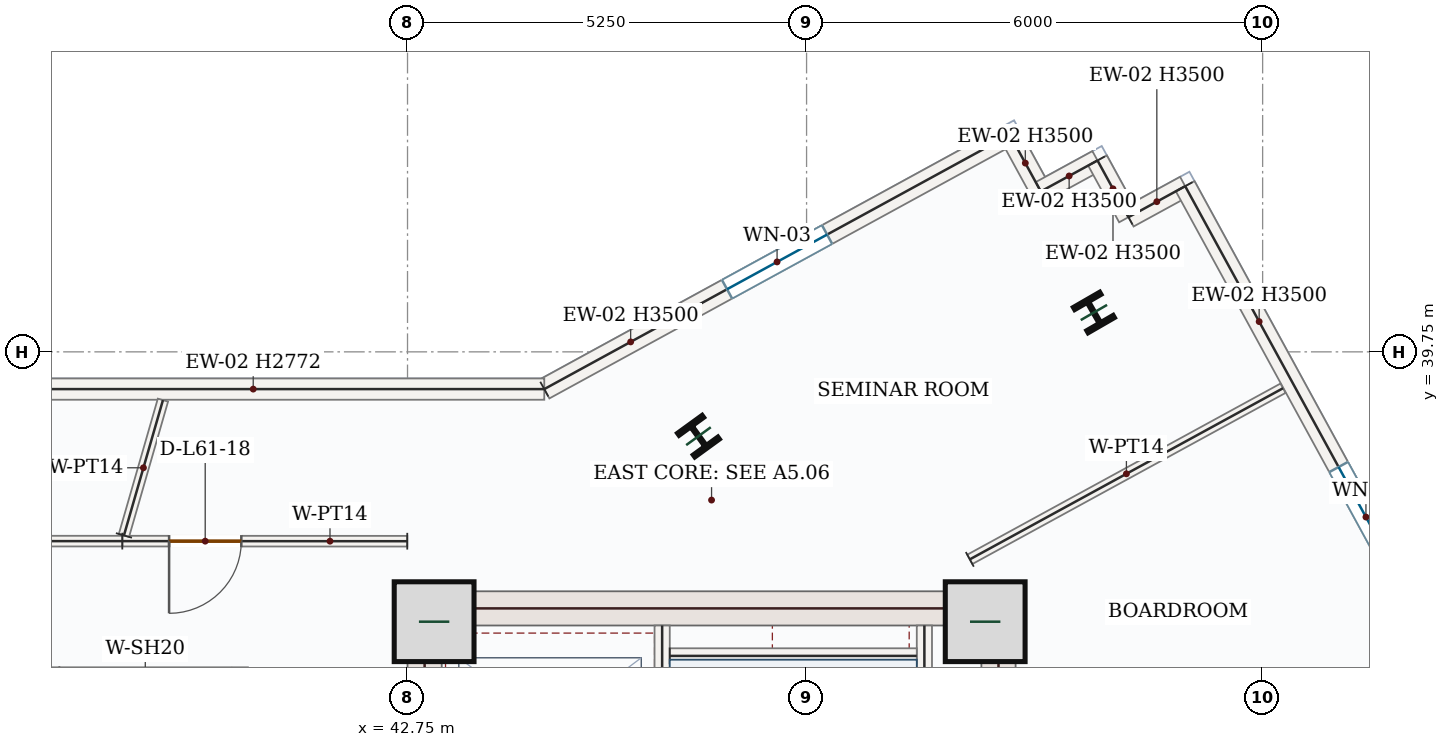
"""IFC4 building model, lengths in metres.
Left out: names, types, materials, properties, quantities, classifications, styles, units other than length and angle.
Written with IfcOpenShell. Run it as: python <this file> out.ifc"""

import sys

from ifc_helpers import new_model, si_unit, direction, frame, frame_2d, origin, origin_2d, place, context, subcontext, project, spatial, rectangle, i_section, extrude, source, transform, mapped, element, fill, save


model = new_model("IFC4")
c1 = context("Model", 3, precision=1e-05, world=origin(), true_north=direction((0.0, 1.0)))
c2 = subcontext(c1, "Body", "Model", "MODEL_VIEW")
j1 = project(units=[si_unit("LENGTHUNIT", "METRE"), si_unit("PLANEANGLEUNIT", "RADIAN")], contexts=[c1])
p1 = place(None, origin())
s1 = spatial("IfcSite", under=j1, at=p1, CompositionType="ELEMENT")
p2 = place(p1, origin())
s2 = spatial("IfcBuilding", under=s1, at=p2, CompositionType="ELEMENT")
p3 = place(p2, frame((0.0, 0.0, 257.85)))
s3 = spatial("IfcBuildingStorey", under=s2, at=p3, CompositionType="ELEMENT", Elevation=257.85)
p4 = place(p3, frame((42.975, 28.05, 0.0), z_axis=(0.0, 0.0, 1.0), x_axis=(0.0, 1.0, 0.0)))
e1 = element("IfcWall", 1, at=p4, inside=s3, PredefinedType="SHEAR", context=c2, shape_type="SweptSolid", body=[
    extrude(rectangle(XDim=8.55, YDim=0.45, at=frame_2d((4.275, 0.0))), origin(), (0.0, 0.0, 1.0), 3.5),
])
p5 = place(p4, frame((1.5, 0.0, 0.0)))
e2 = element("IfcOpeningElement", 2, at=p5, cuts=e1, PredefinedType="OPENING", context=c2, shape_type="SweptSolid", body=[
    extrude(rectangle(XDim=1.1, YDim=2.2, at=frame_2d((0.55, 1.1))), frame((0.0, 0.235, 0.0), z_axis=(0.0, -1.0, 0.0), x_axis=(1.0, 0.0, 0.0)), (0.0, 0.0, 1.0), 0.47),
])
m1 = source(origin(), c2, "Body", "SweptSolid", [
    extrude(rectangle(XDim=8.55, YDim=0.45, at=frame_2d((4.275, 0.0))), origin(), (0.0, 0.0, 1.0), 3.5),
])
p6 = place(p3, frame((50.525, 28.05, 0.0), z_axis=(0.0, 0.0, 1.0), x_axis=(0.0, 1.0, 0.0)))
e3 = element("IfcWall", 3, at=p6, inside=s3, PredefinedType="SHEAR", context=c2, shape_type="MappedRepresentation", body=[
    mapped(m1, transform((0.0, 0.0, 0.0), x_axis=(1.0, 0.0, 0.0), y_axis=(0.0, 1.0, 0.0), z_axis=(0.0, 0.0, 1.0), scale=1.0)),
])
m2 = source(origin(), c2, "Body", "SweptSolid", [
    extrude(rectangle(XDim=7.1, YDim=0.45, at=frame_2d((3.55, 0.0))), origin(), (0.0, 0.0, 1.0), 3.5),
])
p7 = place(p3, frame((43.2, 36.375, 0.0), z_axis=(0.0, 0.0, 1.0), x_axis=(1.0, 0.0, 0.0)))
e4 = element("IfcWall", 4, at=p7, inside=s3, PredefinedType="SHEAR", context=c2, shape_type="MappedRepresentation", body=[
    mapped(m2, transform((0.0, 0.0, 0.0), x_axis=(1.0, 0.0, 0.0), y_axis=(0.0, 1.0, 0.0), z_axis=(0.0, 0.0, 1.0), scale=1.0)),
])
m3 = source(origin(), c2, "Body", "SweptSolid", [
    extrude(rectangle(XDim=1.05, YDim=1.05, at=origin_2d()), origin(), (0.0, 0.0, 1.0), 3.75),
])
for number, where, z_axis, x_axis in (
    (5, (43.1, 36.2, 0.0), (0.0, 0.0, 1.0), (1.0, 0.0, 0.0)),
    (6, (50.35, 36.2, 0.0), (0.0, 0.0, 1.0), (1.0, 0.0, 0.0)),
):
    element("IfcColumn", number, at=place(p3, frame(where, z_axis=z_axis, x_axis=x_axis)), inside=s3, PredefinedType="COLUMN", context=c2, shape_type="MappedRepresentation", body=[
        mapped(m3, transform((0.0, 0.0, 0.0), x_axis=(1.0, 0.0, 0.0), y_axis=(0.0, 1.0, 0.0), z_axis=(0.0, 0.0, 1.0), scale=1.0)),
    ])
m4 = source(origin(), c2, "Body", "SweptSolid", [
    extrude(i_section(OverallWidth=0.399, OverallDepth=0.386, WebThickness=0.021, FlangeThickness=0.033, FilletRadius=0.018, at=origin_2d()), origin(), (0.0, 0.0, 1.0), 3.75),
])
for number, where, z_axis, x_axis in (
    (7, (46.578, 38.641, 0.0), (0.0, 0.0, 1.0), (0.809, 0.588, 0.0)),
    (8, (51.78, 40.268, 0.0), (0.0, 0.0, 1.0), (0.866, 0.5, 0.0)),
):
    element("IfcColumn", number, at=place(p3, frame(where, z_axis=z_axis, x_axis=x_axis)), inside=s3, PredefinedType="COLUMN", context=c2, shape_type="MappedRepresentation", body=[
        mapped(m4, transform((0.0, 0.0, 0.0), x_axis=(1.0, 0.0, 0.0), y_axis=(0.0, 1.0, 0.0), z_axis=(0.0, 0.0, 1.0), scale=1.0)),
    ])
p8 = place(p3, frame((44.549, 39.26, 0.0), z_axis=(0.0, 0.0, 1.0), x_axis=(0.877569176667, 0.479450039279, 0.0)))
e9 = element("IfcWall", 9, at=p8, inside=s3, PredefinedType="SOLIDWALL", context=c2, shape_type="SweptSolid", body=[
    extrude(rectangle(XDim=6.979, YDim=0.28, at=frame_2d((3.49, 0.0))), origin(), (0.0, 0.0, 1.0), 3.5),
])
p9 = place(p8, frame((2.74, 0.0, 0.85)))
e10 = element("IfcOpeningElement", 10, at=p9, cuts=e9, PredefinedType="OPENING", context=c2, shape_type="SweptSolid", body=[
    extrude(rectangle(XDim=1.5, YDim=1.5, at=frame_2d((0.75, 0.75))), frame((0.0, 0.15, 0.0), z_axis=(0.0, -1.0, 0.0), x_axis=(1.0, 0.0, 0.0)), (0.0, 0.0, 1.0), 0.3),
])
m5 = source(origin(), c2, "Body", "SweptSolid", [
    extrude(rectangle(XDim=0.85, YDim=0.28, at=frame_2d((0.425, 0.0))), origin(), (0.0, 0.0, 1.0), 3.5),
])
for number, where, z_axis, x_axis in (
    (11, (50.674, 42.606, 0.0), (0.0, 0.0, 1.0), (0.479, -0.878, 0.0)),
    (12, (51.082, 41.86, 0.0), (0.0, 0.0, 1.0), (0.878, 0.479, 0.0)),
):
    element("IfcWall", number, at=place(p3, frame(where, z_axis=z_axis, x_axis=x_axis)), inside=s3, PredefinedType="SOLIDWALL", context=c2, shape_type="MappedRepresentation", body=[
        mapped(m5, transform((0.0, 0.0, 0.0), x_axis=(1.0, 0.0, 0.0), y_axis=(0.0, 1.0, 0.0), z_axis=(0.0, 0.0, 1.0), scale=1.0)),
    ])
m6 = source(origin(), c2, "Body", "SweptSolid", [
    extrude(rectangle(XDim=0.85, YDim=0.28, at=frame_2d((0.425, 0.0))), origin(), (0.0, 0.0, 1.0), 3.5),
])
p10 = place(p3, frame((51.827, 42.268, 0.0), z_axis=(0.0, 0.0, 1.0), x_axis=(0.479656876283, -0.877456141943, 0.0)))
e13 = element("IfcWall", 13, at=p10, inside=s3, PredefinedType="SOLIDWALL", context=c2, shape_type="MappedRepresentation", body=[
    mapped(m6, transform((0.0, 0.0, 0.0), x_axis=(1.0, 0.0, 0.0), y_axis=(0.0, 1.0, 0.0), z_axis=(0.0, 0.0, 1.0), scale=1.0)),
])
p11 = place(p3, frame((52.235, 41.522, 0.0), z_axis=(0.0, 0.0, 1.0), x_axis=(0.877577015132, 0.479435691737, 0.0)))
e14 = element("IfcWall", 14, at=p11, inside=s3, PredefinedType="SOLIDWALL", context=c2, shape_type="MappedRepresentation", body=[
    mapped(m5, transform((0.0, 0.0, 0.0), x_axis=(1.0, 0.0, 0.0), y_axis=(0.0, 1.0, 0.0), z_axis=(0.0, 0.0, 1.0), scale=1.0)),
])
p12 = place(p3, frame((52.981, 41.929, 0.0), z_axis=(0.0, 0.0, 1.0), x_axis=(0.479472774144, -0.877556755347, 0.0)))
e15 = element("IfcWall", 15, at=p12, inside=s3, PredefinedType="SOLIDWALL", context=c2, shape_type="SweptSolid", body=[
    extrude(rectangle(XDim=9.92, YDim=0.28, at=frame_2d((4.96, 0.0))), origin(), (0.0, 0.0, 1.0), 3.5),
])
p13 = place(p12, frame((4.21, 0.0, 0.85)))
e16 = element("IfcOpeningElement", 16, at=p13, cuts=e15, PredefinedType="OPENING", context=c2, shape_type="SweptSolid", body=[
    extrude(rectangle(XDim=1.5, YDim=1.5, at=frame_2d((0.75, 0.75))), frame((0.0, 0.15, 0.0), z_axis=(0.0, -1.0, 0.0), x_axis=(1.0, 0.0, 0.0)), (0.0, 0.0, 1.0), 0.3),
])
m7 = source(origin(), c2, "Body", "SweptSolid", [
    extrude(rectangle(XDim=7.658, YDim=0.28, at=frame_2d((3.829, 0.0))), origin(), (0.0, 0.0, 1.0), 2.772),
])
p14 = place(p3, frame((36.891, 39.26, 0.0), z_axis=(0.0, 0.0, 1.0), x_axis=(1.0, 0.0, 0.0)))
e17 = element("IfcWall", 17, at=p14, inside=s3, PredefinedType="SOLIDWALL", context=c2, shape_type="MappedRepresentation", body=[
    mapped(m7, transform((0.0, 0.0, 0.0), x_axis=(1.0, 0.0, 0.0), y_axis=(0.0, 1.0, 0.0), z_axis=(0.0, 0.0, 1.0), scale=1.0)),
])
m8 = source(origin(), c2, "Body", "SweptSolid", [
    extrude(rectangle(XDim=7.87, YDim=0.2, at=frame_2d((3.935, 0.0))), origin(), (0.0, 0.0, 1.0), 3.5),
])
p15 = place(p3, frame((49.55, 28.28, 0.0), z_axis=(0.0, 0.0, 1.0), x_axis=(0.0, 1.0, 0.0)))
e18 = element("IfcWall", 18, at=p15, inside=s3, PredefinedType="SOLIDWALL", context=c2, shape_type="MappedRepresentation", body=[
    mapped(m8, transform((0.0, 0.0, 0.0), x_axis=(1.0, 0.0, 0.0), y_axis=(0.0, 1.0, 0.0), z_axis=(0.0, 0.0, 1.0), scale=1.0)),
])
p16 = place(p3, frame((46.1, 28.15, 0.0), z_axis=(0.0, 0.0, 1.0), x_axis=(0.0, 1.0, 0.0)))
e19 = element("IfcWall", 19, at=p16, inside=s3, PredefinedType="SOLIDWALL", context=c2, shape_type="SweptSolid", body=[
    extrude(rectangle(XDim=8.0, YDim=0.2, at=frame_2d((4.0, 0.0))), origin(), (0.0, 0.0, 1.0), 3.5),
])
p17 = place(p16, frame((0.4, 0.0, 0.0)))
e20 = element("IfcOpeningElement", 20, at=p17, cuts=e19, PredefinedType="OPENING", context=c2, shape_type="SweptSolid", body=[
    extrude(rectangle(XDim=1.05, YDim=2.15, at=frame_2d((0.525, 1.075))), frame((0.0, 0.11, 0.0), z_axis=(0.0, -1.0, 0.0), x_axis=(1.0, 0.0, 0.0)), (0.0, 0.0, 1.0), 0.22),
])
m9 = source(origin(), c2, "Body", "SweptSolid", [
    extrude(rectangle(XDim=3.25, YDim=0.2, at=frame_2d((1.625, 0.0))), origin(), (0.0, 0.0, 1.0), 3.5),
])
p18 = place(p3, frame((46.2, 35.75, 0.0), z_axis=(0.0, 0.0, 1.0), x_axis=(1.0, 0.0, 0.0)))
e21 = element("IfcWall", 21, at=p18, inside=s3, PredefinedType="SOLIDWALL", context=c2, shape_type="MappedRepresentation", body=[
    mapped(m9, transform((0.0, 0.0, 0.0), x_axis=(1.0, 0.0, 0.0), y_axis=(0.0, 1.0, 0.0), z_axis=(0.0, 0.0, 1.0), scale=1.0)),
])
m10 = source(origin(), c2, "Body", "SweptSolid", [
    extrude(rectangle(XDim=2.4, YDim=0.2, at=frame_2d((1.2, 0.0))), origin(), (0.0, 0.0, 1.0), 3.5),
])
p19 = place(p3, frame((38.05, 33.2, 0.0), z_axis=(0.0, 0.0, 1.0), x_axis=(0.0, 1.0, 0.0)))
e22 = element("IfcWall", 22, at=p19, inside=s3, PredefinedType="SOLIDWALL", context=c2, shape_type="MappedRepresentation", body=[
    mapped(m10, transform((0.0, 0.0, 0.0), x_axis=(1.0, 0.0, 0.0), y_axis=(0.0, 1.0, 0.0), z_axis=(0.0, 0.0, 1.0), scale=1.0)),
])
p20 = place(p3, frame((40.55, 33.2, 0.0), z_axis=(0.0, 0.0, 1.0), x_axis=(0.0, 1.0, 0.0)))
e23 = element("IfcWall", 23, at=p20, inside=s3, PredefinedType="SOLIDWALL", context=c2, shape_type="SweptSolid", body=[
    extrude(rectangle(XDim=2.4, YDim=0.2, at=frame_2d((1.2, 0.0))), origin(), (0.0, 0.0, 1.0), 3.5),
])
p21 = place(p20, frame((0.65, 0.0, 0.0)))
e24 = element("IfcOpeningElement", 24, at=p21, cuts=e23, PredefinedType="OPENING", context=c2, shape_type="SweptSolid", body=[
    extrude(rectangle(XDim=1.1, YDim=2.15, at=frame_2d((0.55, 1.075))), frame((0.0, 0.11, 0.0), z_axis=(0.0, -1.0, 0.0), x_axis=(1.0, 0.0, 0.0)), (0.0, 0.0, 1.0), 0.22),
])
m11 = source(origin(), c2, "Body", "SweptSolid", [
    extrude(rectangle(XDim=4.695, YDim=0.14, at=frame_2d((2.348, 0.0))), origin(), (0.0, 0.0, 1.0), 3.5),
])
p22 = place(p3, frame((50.148, 37.02, 0.0), z_axis=(0.0, 0.0, 1.0), x_axis=(0.877559526902, 0.479467701461, 0.0)))
e25 = element("IfcWall", 25, at=p22, inside=s3, PredefinedType="PARTITIONING", context=c2, shape_type="MappedRepresentation", body=[
    mapped(m11, transform((0.0, 0.0, 0.0), x_axis=(1.0, 0.0, 0.0), y_axis=(0.0, 1.0, 0.0), z_axis=(0.0, 0.0, 1.0), scale=1.0)),
])
p23 = place(p3, frame((56.109, 35.901, 0.0), z_axis=(0.0, 0.0, 1.0), x_axis=(-0.877574248726, -0.479440755436, 0.0)))
e26 = element("IfcWall", 26, at=p23, inside=s3, PredefinedType="PARTITIONING", context=c2, shape_type="SweptSolid", body=[
    extrude(rectangle(XDim=6.102, YDim=0.14, at=frame_2d((3.051, 0.0))), origin(), (0.0, 0.0, 1.0), 3.5),
])
p24 = place(p23, frame((4.018, 0.0, 0.0)))
e27 = element("IfcOpeningElement", 27, at=p24, cuts=e26, PredefinedType="OPENING", context=c2, shape_type="SweptSolid", body=[
    extrude(rectangle(XDim=0.95, YDim=2.15, at=frame_2d((0.475, 1.075))), frame((0.0, 0.08, 0.0), z_axis=(0.0, -1.0, 0.0), x_axis=(1.0, 0.0, 0.0)), (0.0, 0.0, 1.0), 0.16),
])
p25 = place(p3, frame((42.747, 37.259, 0.0), z_axis=(0.0, 0.0, 1.0), x_axis=(-0.99999994699, 0.000325605609, 0.0)))
e28 = element("IfcWall", 28, at=p25, inside=s3, PredefinedType="PARTITIONING", context=c2, shape_type="SweptSolid", body=[
    extrude(rectangle(XDim=3.749, YDim=0.14, at=frame_2d((1.875, 0.0))), origin(), (0.0, 0.0, 1.0), 3.5),
])
p26 = place(p25, frame((2.183, 0.0, 0.0)))
e29 = element("IfcOpeningElement", 29, at=p26, cuts=e28, PredefinedType="OPENING", context=c2, shape_type="SweptSolid", body=[
    extrude(rectangle(XDim=0.95, YDim=2.15, at=frame_2d((0.475, 1.075))), frame((0.0, 0.08, 0.0), z_axis=(0.0, -1.0, 0.0), x_axis=(1.0, 0.0, 0.0)), (0.0, 0.0, 1.0), 0.16),
])
m12 = source(origin(), c2, "Body", "SweptSolid", [
    extrude(rectangle(XDim=1.853, YDim=0.14, at=frame_2d((0.926, 0.0))), origin(), (0.0, 0.0, 1.0), 3.5),
])
p27 = place(p3, frame((39.019, 37.335, 0.0), z_axis=(0.0, 0.0, 1.0), x_axis=(0.276896245691, 0.960899822626, 0.0)))
e30 = element("IfcWall", 30, at=p27, inside=s3, PredefinedType="PARTITIONING", context=c2, shape_type="MappedRepresentation", body=[
    mapped(m12, transform((0.0, 0.0, 0.0), x_axis=(1.0, 0.0, 0.0), y_axis=(0.0, 1.0, 0.0), z_axis=(0.0, 0.0, 1.0), scale=1.0)),
])
p28 = place(p3, frame((38.998, 37.26, 0.0), z_axis=(0.0, 0.0, 1.0), x_axis=(-1.0, 0.0, 0.0)))
e31 = element("IfcWall", 31, at=p28, inside=s3, PredefinedType="PARTITIONING", context=c2, shape_type="SweptSolid", body=[
    extrude(rectangle(XDim=8.956, YDim=0.14, at=frame_2d((4.478, 0.0))), origin(), (0.0, 0.0, 1.0), 3.5),
])
p29 = place(p28, frame((2.802, 0.0, 0.0)))
e32 = element("IfcOpeningElement", 32, at=p29, cuts=e31, PredefinedType="OPENING", context=c2, shape_type="SweptSolid", body=[
    extrude(rectangle(XDim=0.95, YDim=2.15, at=frame_2d((0.475, 1.075))), frame((0.0, 0.08, 0.0), z_axis=(0.0, -1.0, 0.0), x_axis=(1.0, 0.0, 0.0)), (0.0, 0.0, 1.0), 0.16),
])
m13 = source(origin(), c2, "Body", "SweptSolid", [
    extrude(rectangle(XDim=1.5, YDim=1.5, at=frame_2d((0.75, 0.75))), frame((0.0, 0.03, 0.0), z_axis=(0.0, -1.0, 0.0), x_axis=(1.0, 0.0, 0.0)), (0.0, 0.0, 1.0), 0.06),
])
p30 = place(p9, origin())
e33 = element("IfcWindow", 33, at=p30, inside=s3, PartitioningType="SINGLE_PANEL", PredefinedType="WINDOW", context=c2, shape_type="MappedRepresentation", body=[
    mapped(m13, transform((0.0, 0.0, 0.0), x_axis=(1.0, 0.0, 0.0), y_axis=(0.0, 1.0, 0.0), z_axis=(0.0, 0.0, 1.0), scale=1.0)),
])
fill(e10, e33)
p31 = place(p13, origin())
e34 = element("IfcWindow", 34, at=p31, inside=s3, PartitioningType="SINGLE_PANEL", PredefinedType="WINDOW", context=c2, shape_type="MappedRepresentation", body=[
    mapped(m13, transform((0.0, 0.0, 0.0), x_axis=(1.0, 0.0, 0.0), y_axis=(0.0, 1.0, 0.0), z_axis=(0.0, 0.0, 1.0), scale=1.0)),
])
fill(e16, e34)
m14 = source(origin(), c2, "Body", "SweptSolid", [
    extrude(rectangle(XDim=0.95, YDim=2.15, at=frame_2d((0.475, 1.075))), frame((0.0, 0.025, 0.0), z_axis=(0.0, -1.0, 0.0), x_axis=(1.0, 0.0, 0.0)), (0.0, 0.0, 1.0), 0.05),
])
p32 = place(p26, origin())
e35 = element("IfcDoor", 35, at=p32, inside=s3, OperationType="SINGLE_SWING_RIGHT", PredefinedType="DOOR", context=c2, shape_type="MappedRepresentation", body=[
    mapped(m14, transform((0.0, 0.0, 0.0), x_axis=(1.0, 0.0, 0.0), y_axis=(0.0, 1.0, 0.0), z_axis=(0.0, 0.0, 1.0), scale=1.0)),
])
fill(e29, e35)
save(model, sys.argv[1])
